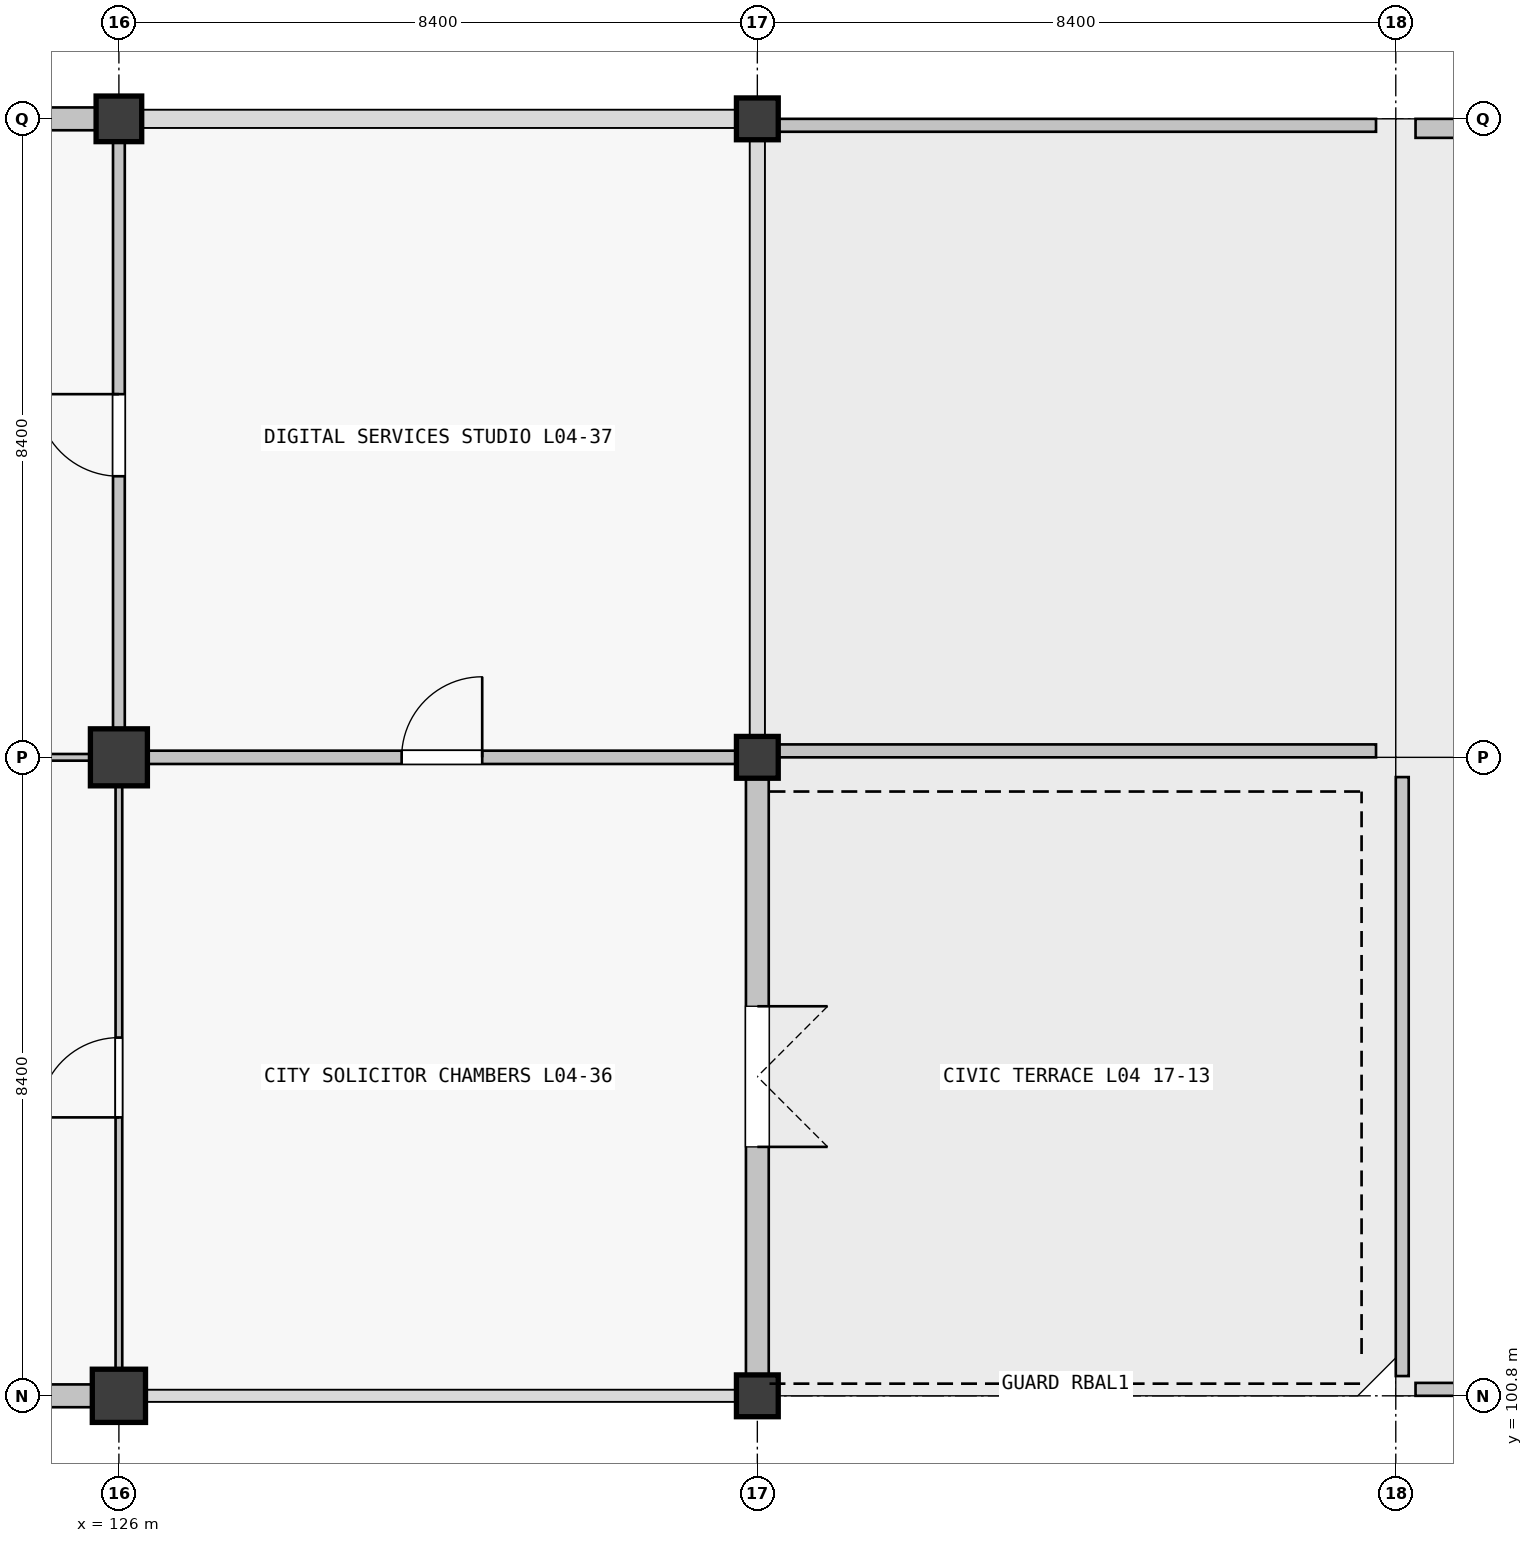
"""IFC4 building model, lengths in metres.
Left out: names, types, materials, properties, quantities, classifications, styles, units other than length and angle.
Written with IfcOpenShell. Run it as: python <this file> out.ifc"""

import sys

from ifc_helpers import new_model, si_unit, direction, frame, frame_2d, origin, origin_2d, place, context, subcontext, project, spatial, rectangle, extrude, element, fill, save


model = new_model("IFC4")
c1 = context("Model", 3, precision=1e-05, world=origin(), true_north=direction((0.0, 1.0)))
c2 = subcontext(c1, "Body", "Model", "MODEL_VIEW")
j1 = project(units=[si_unit("LENGTHUNIT", "METRE"), si_unit("PLANEANGLEUNIT", "RADIAN")], contexts=[c1])
p1 = place(None, origin())
s1 = spatial("IfcSite", under=j1, at=p1, CompositionType="ELEMENT")
p2 = place(p1, origin())
s2 = spatial("IfcBuilding", under=s1, at=p2, CompositionType="ELEMENT")
p3 = place(p2, frame((0.0, 0.0, 19.08)))
s3 = spatial("IfcBuildingStorey", under=s2, at=p3, CompositionType="ELEMENT", Elevation=19.08)
p4 = place(p3, frame((126.0, 100.8, 0.0), z_axis=(0.0, 0.0, 1.0), x_axis=(1.0, 0.0, 0.0)))
e1 = element("IfcColumn", 1, at=p4, inside=s3, PredefinedType="COLUMN", context=c2, shape_type="SweptSolid", body=[
    extrude(rectangle(XDim=0.7, YDim=0.7, at=origin_2d()), origin(), (0.0, 0.0, 1.0), 4.32),
])
p5 = place(p3, frame((126.0, 109.2, 0.0), z_axis=(0.0, 0.0, 1.0), x_axis=(1.0, 0.0, 0.0)))
e2 = element("IfcColumn", 2, at=p5, inside=s3, PredefinedType="COLUMN", context=c2, shape_type="SweptSolid", body=[
    extrude(rectangle(XDim=0.75, YDim=0.75, at=origin_2d()), origin(), (0.0, 0.0, 1.0), 4.32),
])
p6 = place(p3, frame((126.0, 117.6, 0.0), z_axis=(0.0, 0.0, 1.0), x_axis=(1.0, 0.0, 0.0)))
e3 = element("IfcColumn", 3, at=p6, inside=s3, PredefinedType="COLUMN", context=c2, shape_type="SweptSolid", body=[
    extrude(rectangle(XDim=0.6, YDim=0.6, at=origin_2d()), origin(), (0.0, 0.0, 1.0), 4.32),
])
for number, where, z_axis, x_axis in (
    (4, (134.4, 100.8, 0.0), (0.0, 0.0, 1.0), (1.0, 0.0, 0.0)),
    (5, (134.4, 109.2, 0.0), (0.0, 0.0, 1.0), (1.0, 0.0, 0.0)),
    (6, (134.4, 117.6, 0.0), (0.0, 0.0, 1.0), (1.0, 0.0, 0.0)),
):
    element("IfcColumn", number, at=place(p3, frame(where, z_axis=z_axis, x_axis=x_axis)), inside=s3, PredefinedType="COLUMN", context=c2, shape_type="SweptSolid", body=[
        extrude(rectangle(XDim=0.55, YDim=0.55, at=origin_2d()), origin(), (0.0, 0.0, 1.0), 4.07),
    ])
p7 = place(p3, frame((125.649, 100.8, 0.0), z_axis=(0.0, 0.0, 1.0), x_axis=(-1.0, 0.0, 0.0)))
e7 = element("IfcWall", 7, at=p7, inside=s3, PredefinedType="SOLIDWALL", context=c2, shape_type="SweptSolid", body=[
    extrude(rectangle(XDim=7.673, YDim=0.3, at=frame_2d((3.836, 0.0))), origin(), (0.0, 0.0, 1.0), 3.37),
])
p8 = place(p7, frame((2.861, 0.0, 0.9)))
e8 = element("IfcOpeningElement", 8, at=p8, cuts=e7, PredefinedType="OPENING", context=c2, shape_type="SweptSolid", body=[
    extrude(rectangle(XDim=1.95, YDim=1.6, at=frame_2d((0.975, 0.8))), frame((0.0, 0.15, 0.0), z_axis=(0.0, -1.0, 0.0), x_axis=(1.0, 0.0, 0.0)), (0.0, 0.0, 1.0), 0.3),
])
p9 = place(p3, frame((117.926, 117.6, 0.0), z_axis=(0.0, 0.0, 1.0), x_axis=(1.0, 0.0, 0.0)))
e9 = element("IfcWall", 9, at=p9, inside=s3, PredefinedType="SOLIDWALL", context=c2, shape_type="SweptSolid", body=[
    extrude(rectangle(XDim=7.773, YDim=0.3, at=frame_2d((3.886, 0.0))), origin(), (0.0, 0.0, 1.0), 3.37),
])
p10 = place(p9, frame((2.712, 0.0, 0.9)))
e10 = element("IfcOpeningElement", 10, at=p10, cuts=e9, PredefinedType="OPENING", context=c2, shape_type="SweptSolid", body=[
    extrude(rectangle(XDim=2.35, YDim=1.6, at=frame_2d((1.175, 0.8))), frame((0.0, 0.15, 0.0), z_axis=(0.0, -1.0, 0.0), x_axis=(1.0, 0.0, 0.0)), (0.0, 0.0, 1.0), 0.3),
])
p11 = place(p3, frame((134.4, 108.924, 0.0), z_axis=(0.0, 0.0, 1.0), x_axis=(0.0, -1.0, 0.0)))
e11 = element("IfcWall", 11, at=p11, inside=s3, PredefinedType="SOLIDWALL", context=c2, shape_type="SweptSolid", body=[
    extrude(rectangle(XDim=7.848, YDim=0.3, at=frame_2d((3.924, 0.0))), origin(), (0.0, 0.0, 1.0), 3.37),
])
p12 = place(p11, frame((2.999, 0.0, 0.0)))
e12 = element("IfcOpeningElement", 12, at=p12, cuts=e11, PredefinedType="OPENING", context=c2, shape_type="SweptSolid", body=[
    extrude(rectangle(XDim=1.85, YDim=2.2, at=frame_2d((0.925, 1.1))), frame((0.0, 0.15, 0.0), z_axis=(0.0, -1.0, 0.0), x_axis=(1.0, 0.0, 0.0)), (0.0, 0.0, 1.0), 0.3),
])
for number, where, z_axis, x_axis in (
    (13, (142.54, 109.285, 0.0), (0.0, 0.0, 1.0), (-1.0, 0.0, 0.0)),
    (14, (134.66, 117.515, 0.0), (0.0, 0.0, 1.0), (1.0, 0.0, 0.0)),
):
    element("IfcWall", number, at=place(p3, frame(where, z_axis=z_axis, x_axis=x_axis)), inside=s3, PredefinedType="PARAPET", context=c2, shape_type="SweptSolid", body=[
        extrude(rectangle(XDim=7.88, YDim=0.17, at=frame_2d((3.94, 0.0))), origin(), (0.0, 0.0, 1.0), 0.95),
    ])
for number, where, z_axis, x_axis in (
    (15, (150.94, 100.885, 0.0), (0.0, 0.0, 1.0), (-1.0, 0.0, 0.0)),
    (16, (142.885, 101.06, 0.0), (0.0, 0.0, 1.0), (0.0, 1.0, 0.0)),
):
    element("IfcWall", number, at=place(p3, frame(where, z_axis=z_axis, x_axis=x_axis)), inside=s3, PredefinedType="PARAPET", context=c2, shape_type="SweptSolid", body=[
        extrude(rectangle(XDim=7.88, YDim=0.17, at=frame_2d((3.94, 0.0))), origin(), (0.0, 0.0, 1.0), 0.95),
    ])
p13 = place(p3, frame((143.06, 117.475, 0.0), z_axis=(0.0, 0.0, 1.0), x_axis=(1.0, 0.0, 0.0)))
e17 = element("IfcWall", 17, at=p13, inside=s3, PredefinedType="PARAPET", context=c2, shape_type="SweptSolid", body=[
    extrude(rectangle(XDim=7.88, YDim=0.25, at=frame_2d((3.94, 0.0))), origin(), (0.0, 0.0, 1.0), 0.95),
])
p14 = place(p3, frame((117.952, 109.2, 0.0), z_axis=(0.0, 0.0, 1.0), x_axis=(1.0, 0.0, 0.0)))
e18 = element("IfcWall", 18, at=p14, inside=s3, PredefinedType="PARTITIONING", context=c2, shape_type="SweptSolid", body=[
    extrude(rectangle(XDim=7.671, YDim=0.088, at=frame_2d((3.835, 0.0))), origin(), (0.0, 0.0, 1.0), 3.19),
])
p15 = place(p14, frame((3.316, 0.0, 0.0)))
e19 = element("IfcOpeningElement", 19, at=p15, cuts=e18, PredefinedType="OPENING", context=c2, shape_type="SweptSolid", body=[
    extrude(rectangle(XDim=1.04, YDim=2.2, at=frame_2d((0.52, 1.1))), frame((0.0, 0.044, 0.0), z_axis=(0.0, -1.0, 0.0), x_axis=(1.0, 0.0, 0.0)), (0.0, 0.0, 1.0), 0.088),
])
p16 = place(p3, frame((126.377, 109.2, 0.0), z_axis=(0.0, 0.0, 1.0), x_axis=(1.0, 0.0, 0.0)))
e20 = element("IfcWall", 20, at=p16, inside=s3, PredefinedType="PARTITIONING", context=c2, shape_type="SweptSolid", body=[
    extrude(rectangle(XDim=7.746, YDim=0.175, at=frame_2d((3.873, 0.0))), origin(), (0.0, 0.0, 1.0), 3.19),
])
p17 = place(p16, frame((3.343, 0.0, 0.0)))
e21 = element("IfcOpeningElement", 21, at=p17, cuts=e20, PredefinedType="OPENING", context=c2, shape_type="SweptSolid", body=[
    extrude(rectangle(XDim=1.06, YDim=2.25, at=frame_2d((0.53, 1.125))), frame((0.0, 0.087, 0.0), z_axis=(0.0, -1.0, 0.0), x_axis=(1.0, 0.0, 0.0)), (0.0, 0.0, 1.0), 0.175),
])
p18 = place(p3, frame((126.0, 101.152, 0.0), z_axis=(0.0, 0.0, 1.0), x_axis=(0.0, 1.0, 0.0)))
e22 = element("IfcWall", 22, at=p18, inside=s3, PredefinedType="PARTITIONING", context=c2, shape_type="SweptSolid", body=[
    extrude(rectangle(XDim=7.671, YDim=0.088, at=frame_2d((3.835, 0.0))), origin(), (0.0, 0.0, 1.0), 3.19),
])
p19 = place(p18, frame((3.311, 0.0, 0.0)))
e23 = element("IfcOpeningElement", 23, at=p19, cuts=e22, PredefinedType="OPENING", context=c2, shape_type="SweptSolid", body=[
    extrude(rectangle(XDim=1.05, YDim=2.12, at=frame_2d((0.525, 1.06))), frame((0.0, 0.044, 0.0), z_axis=(0.0, -1.0, 0.0), x_axis=(1.0, 0.0, 0.0)), (0.0, 0.0, 1.0), 0.088),
])
p20 = place(p3, frame((126.0, 109.577, 0.0), z_axis=(0.0, 0.0, 1.0), x_axis=(0.0, 1.0, 0.0)))
e24 = element("IfcWall", 24, at=p20, inside=s3, PredefinedType="PARTITIONING", context=c2, shape_type="SweptSolid", body=[
    extrude(rectangle(XDim=7.721, YDim=0.155, at=frame_2d((3.861, 0.0))), origin(), (0.0, 0.0, 1.0), 3.19),
])
p21 = place(p20, frame((3.321, 0.0, 0.0)))
e25 = element("IfcOpeningElement", 25, at=p21, cuts=e24, PredefinedType="OPENING", context=c2, shape_type="SweptSolid", body=[
    extrude(rectangle(XDim=1.08, YDim=2.25, at=frame_2d((0.54, 1.125))), frame((0.0, 0.078, 0.0), z_axis=(0.0, -1.0, 0.0), x_axis=(1.0, 0.0, 0.0)), (0.0, 0.0, 1.0), 0.155),
])
p22 = place(p12, origin())
e26 = element("IfcDoor", 26, at=p22, inside=s3, OperationType="DOUBLE_DOOR_SINGLE_SWING", PredefinedType="DOOR", context=c2, shape_type="SweptSolid", body=[
    extrude(rectangle(XDim=1.85, YDim=2.2, at=frame_2d((0.925, 1.1))), frame((0.0, 0.025, 0.0), z_axis=(0.0, -1.0, 0.0), x_axis=(1.0, 0.0, 0.0)), (0.0, 0.0, 1.0), 0.05),
])
fill(e12, e26)
p23 = place(p3, frame((0.0, 0.0, -0.25)))
p24 = place(p23, frame((138.6, 113.4, 0.0)))
p25 = place(p24, frame((0.0, 0.0, 0.2)))
e27 = element("IfcWindow", 27, at=p25, inside=s3, PartitioningType="SINGLE_PANEL", PredefinedType="SKYLIGHT", context=c2, shape_type="SweptSolid", body=[
    extrude(rectangle(XDim=1.6, YDim=1.6, at=origin_2d()), origin(), (0.0, 0.0, 1.0), 0.05),
])
p26 = place(p19, origin())
e28 = element("IfcDoor", 28, at=p26, inside=s3, OperationType="SINGLE_SWING_LEFT", PredefinedType="DOOR", context=c2, shape_type="SweptSolid", body=[
    extrude(rectangle(XDim=1.05, YDim=2.12, at=frame_2d((0.525, 1.06))), frame((0.0, 0.025, 0.0), z_axis=(0.0, -1.0, 0.0), x_axis=(1.0, 0.0, 0.0)), (0.0, 0.0, 1.0), 0.05),
])
fill(e23, e28)
p27 = place(p17, origin())
e29 = element("IfcDoor", 29, at=p27, inside=s3, OperationType="SINGLE_SWING_RIGHT", PredefinedType="DOOR", context=c2, shape_type="SweptSolid", body=[
    extrude(rectangle(XDim=1.06, YDim=2.25, at=frame_2d((0.53, 1.125))), frame((0.0, 0.025, 0.0), z_axis=(0.0, -1.0, 0.0), x_axis=(1.0, 0.0, 0.0)), (0.0, 0.0, 1.0), 0.05),
])
fill(e21, e29)
p28 = place(p21, origin())
e30 = element("IfcDoor", 30, at=p28, inside=s3, OperationType="SINGLE_SWING_RIGHT", PredefinedType="DOOR", context=c2, shape_type="SweptSolid", body=[
    extrude(rectangle(XDim=1.08, YDim=2.25, at=frame_2d((0.54, 1.125))), frame((0.0, 0.025, 0.0), z_axis=(0.0, -1.0, 0.0), x_axis=(1.0, 0.0, 0.0)), (0.0, 0.0, 1.0), 0.05),
])
fill(e25, e30)
save(model, sys.argv[1])
